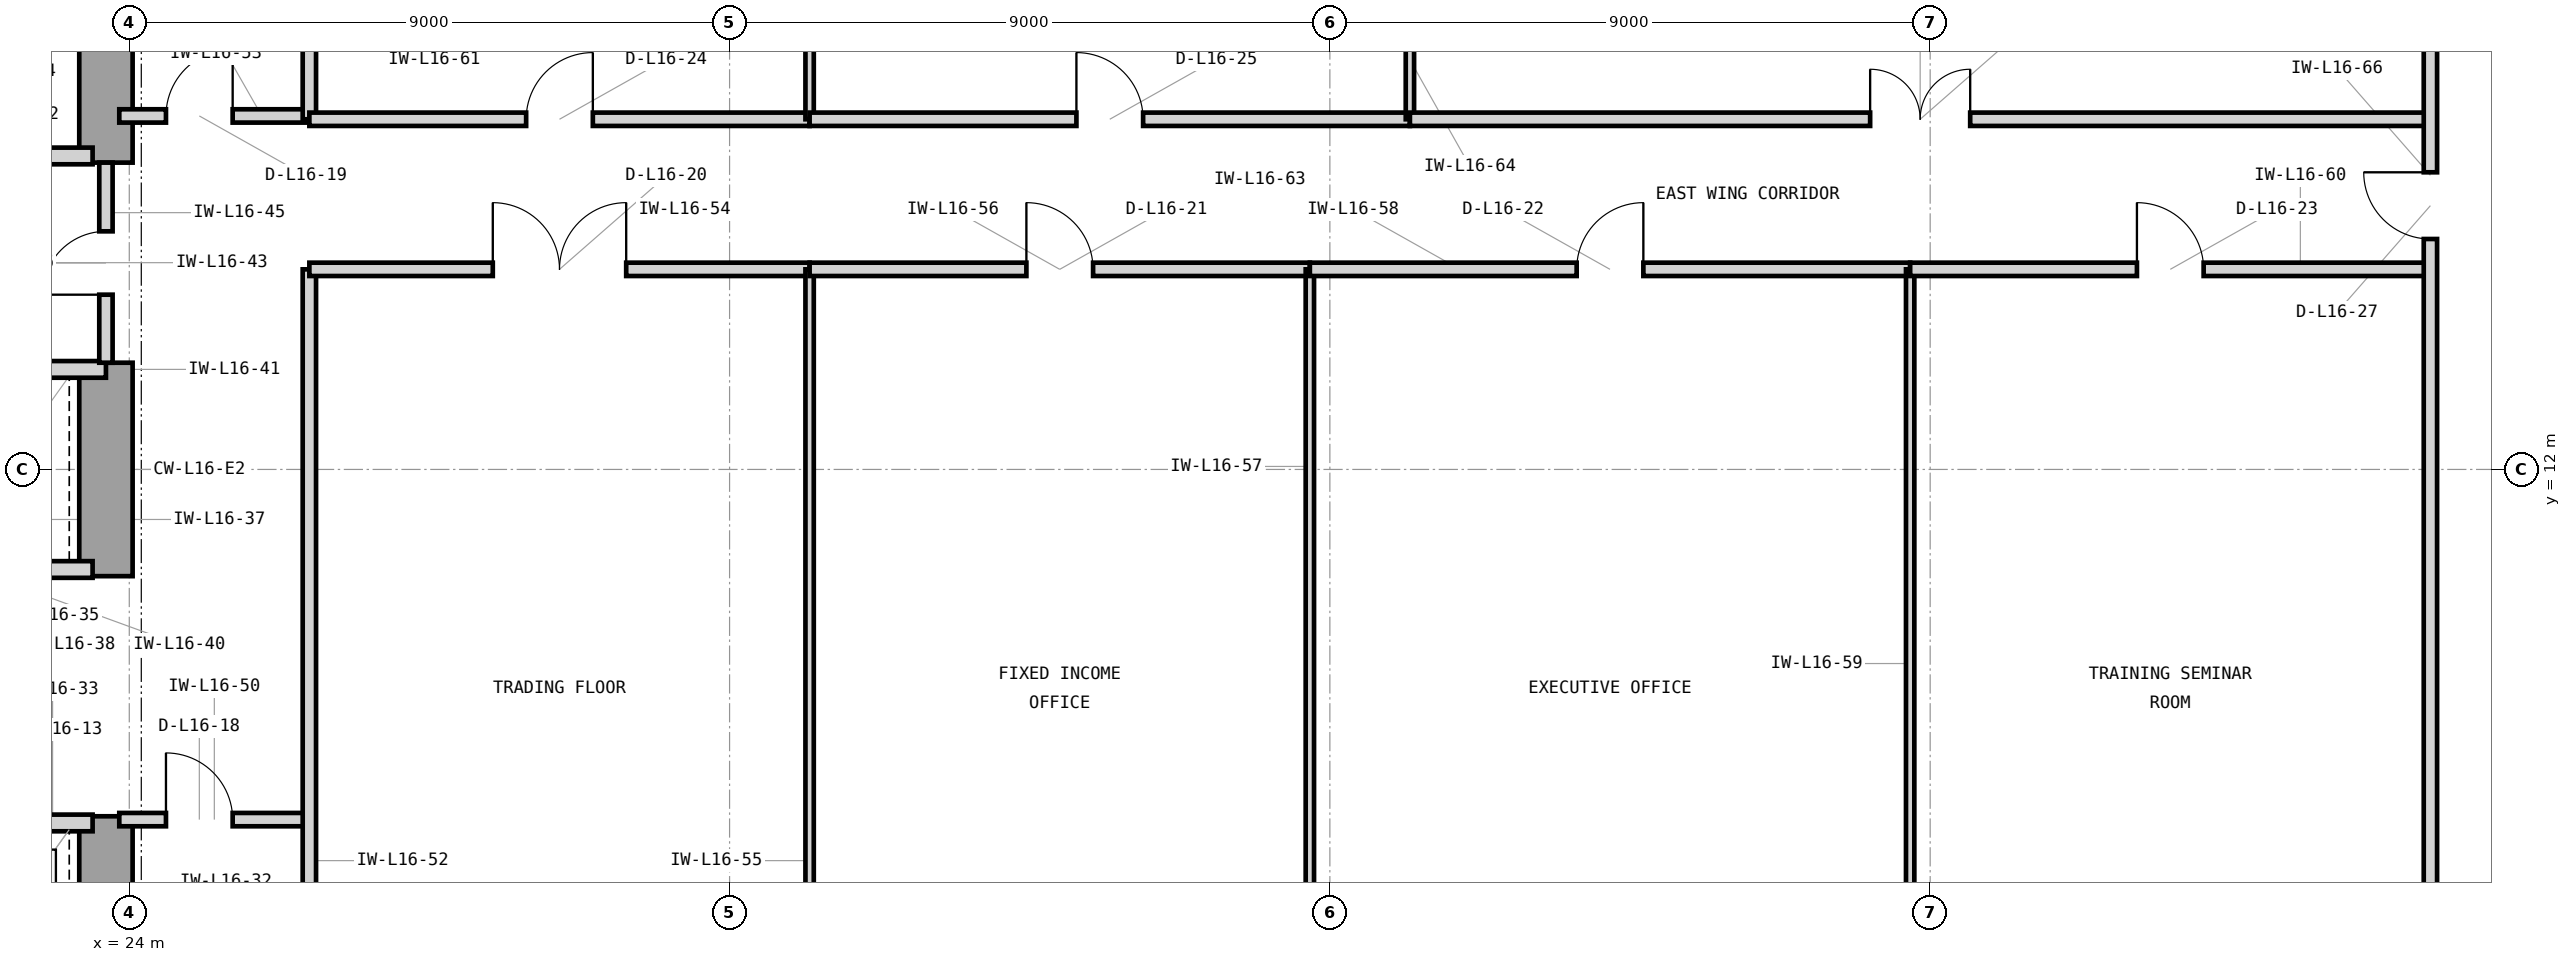
"""IFC4 building model, lengths in metres.
Left out: names, types, materials, properties, quantities, classifications, styles, units other than length and angle.
Written with IfcOpenShell. Run it as: python <this file> out.ifc"""

import sys

from ifc_helpers import new_model, si_unit, direction, frame, frame_2d, origin, place, context, subcontext, project, spatial, rectangle, extrude, element, fill, save


model = new_model("IFC4")
c1 = context("Model", 3, precision=1e-05, world=origin(), true_north=direction((0.0, 1.0)))
c2 = subcontext(c1, "Body", "Model", "MODEL_VIEW")
j1 = project(units=[si_unit("LENGTHUNIT", "METRE"), si_unit("PLANEANGLEUNIT", "RADIAN")], contexts=[c1])
p1 = place(None, origin())
s1 = spatial("IfcSite", under=j1, at=p1, CompositionType="ELEMENT")
p2 = place(p1, origin())
s2 = spatial("IfcBuilding", under=s1, at=p2, CompositionType="ELEMENT")
p3 = place(p2, frame((0.0, 0.0, 72.0)))
s3 = spatial("IfcBuildingStorey", under=s2, at=p3, CompositionType="ELEMENT", Elevation=72.0)
p4 = place(p3, frame((23.65, 3.75, 0.0), z_axis=(0.0, 0.0, 1.0), x_axis=(0.0, 1.0, 0.0)))
e1 = element("IfcWall", 1, at=p4, inside=s3, PredefinedType="SHEAR", context=c2, shape_type="SweptSolid", body=[
    extrude(rectangle(XDim=3.05, YDim=0.8, at=frame_2d((1.525, 0.0))), origin(), (0.0, 0.0, 1.0), 4.2),
])
p5 = place(p3, frame((23.65, 10.4, 0.0), z_axis=(0.0, 0.0, 1.0), x_axis=(0.0, 1.0, 0.0)))
e2 = element("IfcWall", 2, at=p5, inside=s3, PredefinedType="SHEAR", context=c2, shape_type="SweptSolid", body=[
    extrude(rectangle(XDim=3.2, YDim=0.8, at=frame_2d((1.6, 0.0))), origin(), (0.0, 0.0, 1.0), 4.2),
])
p6 = place(p3, frame((23.65, 16.6, 0.0), z_axis=(0.0, 0.0, 1.0), x_axis=(0.0, 1.0, 0.0)))
e3 = element("IfcWall", 3, at=p6, inside=s3, PredefinedType="SHEAR", context=c2, shape_type="SweptSolid", body=[
    extrude(rectangle(XDim=4.05, YDim=0.8, at=frame_2d((2.025, 0.0))), origin(), (0.0, 0.0, 1.0), 4.2),
])
p7 = place(p3, frame((21.05, 16.7, 0.0), z_axis=(0.0, 0.0, 1.0), x_axis=(1.0, 0.0, 0.0)))
e4 = element("IfcWall", 4, at=p7, inside=s3, PredefinedType="PARTITIONING", context=c2, shape_type="SweptSolid", body=[
    extrude(rectangle(XDim=2.4, YDim=0.25, at=frame_2d((1.2, 0.0))), origin(), (0.0, 0.0, 1.0), 3.426),
])
p8 = place(p3, frame((21.05, 6.7, 0.0), z_axis=(0.0, 0.0, 1.0), x_axis=(1.0, 0.0, 0.0)))
e5 = element("IfcWall", 5, at=p8, inside=s3, PredefinedType="PARTITIONING", context=c2, shape_type="SweptSolid", body=[
    extrude(rectangle(XDim=2.4, YDim=0.25, at=frame_2d((1.2, 0.0))), origin(), (0.0, 0.0, 1.0), 3.426),
])
p9 = place(p8, frame((0.48, 0.0, 0.0)))
e6 = element("IfcOpeningElement", 6, at=p9, cuts=e5, PredefinedType="OPENING", context=c2, shape_type="SweptSolid", body=[
    extrude(rectangle(XDim=1.15, YDim=2.25, at=frame_2d((0.575, 1.125))), frame((0.0, 0.135, 0.0), z_axis=(0.0, -1.0, 0.0), x_axis=(1.0, 0.0, 0.0)), (0.0, 0.0, 1.0), 0.27),
])
p10 = place(p3, frame((21.05, 10.5, 0.0), z_axis=(0.0, 0.0, 1.0), x_axis=(1.0, 0.0, 0.0)))
e7 = element("IfcWall", 7, at=p10, inside=s3, PredefinedType="PARTITIONING", context=c2, shape_type="SweptSolid", body=[
    extrude(rectangle(XDim=2.4, YDim=0.25, at=frame_2d((1.2, 0.0))), origin(), (0.0, 0.0, 1.0), 3.426),
])
p11 = place(p3, frame((14.7, 13.5, 0.0), z_axis=(0.0, 0.0, 1.0), x_axis=(1.0, 0.0, 0.0)))
e8 = element("IfcWall", 8, at=p11, inside=s3, PredefinedType="PARTITIONING", context=c2, shape_type="SweptSolid", body=[
    extrude(rectangle(XDim=8.95, YDim=0.25, at=frame_2d((4.475, 0.0))), origin(), (0.0, 0.0, 1.0), 3.426),
])
p12 = place(p3, frame((23.65, 13.6, 0.0), z_axis=(0.0, 0.0, 1.0), x_axis=(0.0, 1.0, 0.0)))
e9 = element("IfcWall", 9, at=p12, inside=s3, PredefinedType="PARTITIONING", context=c2, shape_type="SweptSolid", body=[
    extrude(rectangle(XDim=3.0, YDim=0.2, at=frame_2d((1.5, 0.0))), origin(), (0.0, 0.0, 1.0), 3.97),
])
p13 = place(p12, frame((1.02, 0.0, 0.0)))
e10 = element("IfcOpeningElement", 10, at=p13, cuts=e9, PredefinedType="OPENING", context=c2, shape_type="SweptSolid", body=[
    extrude(rectangle(XDim=0.95, YDim=2.1, at=frame_2d((0.475, 1.05))), frame((0.0, 0.11, 0.0), z_axis=(0.0, -1.0, 0.0), x_axis=(1.0, 0.0, 0.0)), (0.0, 0.0, 1.0), 0.22),
])
p14 = place(p3, frame((23.85, 6.75, 0.0), z_axis=(0.0, 0.0, 1.0), x_axis=(1.0, 0.0, 0.0)))
e11 = element("IfcWall", 11, at=p14, inside=s3, PredefinedType="PARTITIONING", context=c2, shape_type="SweptSolid", body=[
    extrude(rectangle(XDim=2.85, YDim=0.2, at=frame_2d((1.425, 0.0))), origin(), (0.0, 0.0, 1.0), 3.97),
])
p15 = place(p14, frame((0.7, 0.0, 0.0)))
e12 = element("IfcOpeningElement", 12, at=p15, cuts=e11, PredefinedType="OPENING", context=c2, shape_type="SweptSolid", body=[
    extrude(rectangle(XDim=1.0, YDim=2.15, at=frame_2d((0.5, 1.075))), frame((0.0, 0.11, 0.0), z_axis=(0.0, -1.0, 0.0), x_axis=(1.0, 0.0, 0.0)), (0.0, 0.0, 1.0), 0.22),
])
p16 = place(p3, frame((23.85, 17.3, 0.0), z_axis=(0.0, 0.0, 1.0), x_axis=(1.0, 0.0, 0.0)))
e13 = element("IfcWall", 13, at=p16, inside=s3, PredefinedType="PARTITIONING", context=c2, shape_type="SweptSolid", body=[
    extrude(rectangle(XDim=2.85, YDim=0.2, at=frame_2d((1.425, 0.0))), origin(), (0.0, 0.0, 1.0), 3.97),
])
p17 = place(p16, frame((0.7, 0.0, 0.0)))
e14 = element("IfcOpeningElement", 14, at=p17, cuts=e13, PredefinedType="OPENING", context=c2, shape_type="SweptSolid", body=[
    extrude(rectangle(XDim=1.0, YDim=2.15, at=frame_2d((0.5, 1.075))), frame((0.0, 0.11, 0.0), z_axis=(0.0, -1.0, 0.0), x_axis=(1.0, 0.0, 0.0)), (0.0, 0.0, 1.0), 0.22),
])
p18 = place(p3, frame((26.7, 3.18, 0.0), z_axis=(0.0, 0.0, 1.0), x_axis=(0.0, 1.0, 0.0)))
e15 = element("IfcWall", 15, at=p18, inside=s3, PredefinedType="PARTITIONING", context=c2, shape_type="SweptSolid", body=[
    extrude(rectangle(XDim=11.82, YDim=0.2, at=frame_2d((5.91, 0.0))), origin(), (0.0, 0.0, 1.0), 3.97),
])
p19 = place(p3, frame((26.7, 17.25, 0.0), z_axis=(0.0, 0.0, 1.0), x_axis=(0.0, 1.0, 0.0)))
e16 = element("IfcWall", 16, at=p19, inside=s3, PredefinedType="PARTITIONING", context=c2, shape_type="SweptSolid", body=[
    extrude(rectangle(XDim=3.57, YDim=0.2, at=frame_2d((1.785, 0.0))), origin(), (0.0, 0.0, 1.0), 3.97),
])
p20 = place(p3, frame((26.7, 15.0, 0.0), z_axis=(0.0, 0.0, 1.0), x_axis=(1.0, 0.0, 0.0)))
e17 = element("IfcWall", 17, at=p20, inside=s3, PredefinedType="PARTITIONING", context=c2, shape_type="SweptSolid", body=[
    extrude(rectangle(XDim=7.5, YDim=0.2, at=frame_2d((3.75, 0.0))), origin(), (0.0, 0.0, 1.0), 3.426),
])
p21 = place(p20, frame((2.75, 0.0, 0.0)))
e18 = element("IfcOpeningElement", 18, at=p21, cuts=e17, PredefinedType="OPENING", context=c2, shape_type="SweptSolid", body=[
    extrude(rectangle(XDim=2.0, YDim=2.5, at=frame_2d((1.0, 1.25))), frame((0.0, 0.11, 0.0), z_axis=(0.0, -1.0, 0.0), x_axis=(1.0, 0.0, 0.0)), (0.0, 0.0, 1.0), 0.22),
])
p22 = place(p3, frame((34.2, 3.18, 0.0), z_axis=(0.0, 0.0, 1.0), x_axis=(0.0, 1.0, 0.0)))
e19 = element("IfcWall", 19, at=p22, inside=s3, PredefinedType="PARTITIONING", context=c2, shape_type="SweptSolid", body=[
    extrude(rectangle(XDim=11.82, YDim=0.125, at=frame_2d((5.91, 0.0))), origin(), (0.0, 0.0, 1.0), 3.97),
])
p23 = place(p3, frame((34.2, 15.0, 0.0), z_axis=(0.0, 0.0, 1.0), x_axis=(1.0, 0.0, 0.0)))
e20 = element("IfcWall", 20, at=p23, inside=s3, PredefinedType="PARTITIONING", context=c2, shape_type="SweptSolid", body=[
    extrude(rectangle(XDim=7.5, YDim=0.2, at=frame_2d((3.75, 0.0))), origin(), (0.0, 0.0, 1.0), 3.426),
])
p24 = place(p23, frame((3.25, 0.0, 0.0)))
e21 = element("IfcOpeningElement", 21, at=p24, cuts=e20, PredefinedType="OPENING", context=c2, shape_type="SweptSolid", body=[
    extrude(rectangle(XDim=1.0, YDim=2.15, at=frame_2d((0.5, 1.075))), frame((0.0, 0.11, 0.0), z_axis=(0.0, -1.0, 0.0), x_axis=(1.0, 0.0, 0.0)), (0.0, 0.0, 1.0), 0.22),
])
p25 = place(p3, frame((41.7, 3.18, 0.0), z_axis=(0.0, 0.0, 1.0), x_axis=(0.0, 1.0, 0.0)))
e22 = element("IfcWall", 22, at=p25, inside=s3, PredefinedType="PARTITIONING", context=c2, shape_type="SweptSolid", body=[
    extrude(rectangle(XDim=11.82, YDim=0.125, at=frame_2d((5.91, 0.0))), origin(), (0.0, 0.0, 1.0), 3.97),
])
p26 = place(p3, frame((41.7, 15.0, 0.0), z_axis=(0.0, 0.0, 1.0), x_axis=(1.0, 0.0, 0.0)))
e23 = element("IfcWall", 23, at=p26, inside=s3, PredefinedType="PARTITIONING", context=c2, shape_type="SweptSolid", body=[
    extrude(rectangle(XDim=9.0, YDim=0.2, at=frame_2d((4.5, 0.0))), origin(), (0.0, 0.0, 1.0), 3.426),
])
p27 = place(p26, frame((4.0, 0.0, 0.0)))
e24 = element("IfcOpeningElement", 24, at=p27, cuts=e23, PredefinedType="OPENING", context=c2, shape_type="SweptSolid", body=[
    extrude(rectangle(XDim=1.0, YDim=2.15, at=frame_2d((0.5, 1.075))), frame((0.0, 0.11, 0.0), z_axis=(0.0, -1.0, 0.0), x_axis=(1.0, 0.0, 0.0)), (0.0, 0.0, 1.0), 0.22),
])
p28 = place(p3, frame((50.7, 3.18, 0.0), z_axis=(0.0, 0.0, 1.0), x_axis=(0.0, 1.0, 0.0)))
e25 = element("IfcWall", 25, at=p28, inside=s3, PredefinedType="PARTITIONING", context=c2, shape_type="SweptSolid", body=[
    extrude(rectangle(XDim=11.82, YDim=0.125, at=frame_2d((5.91, 0.0))), origin(), (0.0, 0.0, 1.0), 3.97),
])
p29 = place(p3, frame((50.7, 15.0, 0.0), z_axis=(0.0, 0.0, 1.0), x_axis=(1.0, 0.0, 0.0)))
e26 = element("IfcWall", 26, at=p29, inside=s3, PredefinedType="PARTITIONING", context=c2, shape_type="SweptSolid", body=[
    extrude(rectangle(XDim=7.8, YDim=0.2, at=frame_2d((3.9, 0.0))), origin(), (0.0, 0.0, 1.0), 3.426),
])
p30 = place(p29, frame((3.4, 0.0, 0.0)))
e27 = element("IfcOpeningElement", 27, at=p30, cuts=e26, PredefinedType="OPENING", context=c2, shape_type="SweptSolid", body=[
    extrude(rectangle(XDim=1.0, YDim=2.15, at=frame_2d((0.5, 1.075))), frame((0.0, 0.11, 0.0), z_axis=(0.0, -1.0, 0.0), x_axis=(1.0, 0.0, 0.0)), (0.0, 0.0, 1.0), 0.22),
])
p31 = place(p3, frame((26.7, 17.25, 0.0), z_axis=(0.0, 0.0, 1.0), x_axis=(1.0, 0.0, 0.0)))
e28 = element("IfcWall", 28, at=p31, inside=s3, PredefinedType="PARTITIONING", context=c2, shape_type="SweptSolid", body=[
    extrude(rectangle(XDim=7.5, YDim=0.2, at=frame_2d((3.75, 0.0))), origin(), (0.0, 0.0, 1.0), 3.97),
])
p32 = place(p31, frame((3.25, 0.0, 0.0)))
e29 = element("IfcOpeningElement", 29, at=p32, cuts=e28, PredefinedType="OPENING", context=c2, shape_type="SweptSolid", body=[
    extrude(rectangle(XDim=1.0, YDim=2.15, at=frame_2d((0.5, 1.075))), frame((0.0, 0.11, 0.0), z_axis=(0.0, -1.0, 0.0), x_axis=(1.0, 0.0, 0.0)), (0.0, 0.0, 1.0), 0.22),
])
p33 = place(p3, frame((34.2, 17.25, 0.0), z_axis=(0.0, 0.0, 1.0), x_axis=(0.0, 1.0, 0.0)))
e30 = element("IfcWall", 30, at=p33, inside=s3, PredefinedType="PARTITIONING", context=c2, shape_type="SweptSolid", body=[
    extrude(rectangle(XDim=3.57, YDim=0.125, at=frame_2d((1.785, 0.0))), origin(), (0.0, 0.0, 1.0), 3.97),
])
p34 = place(p3, frame((34.2, 17.25, 0.0), z_axis=(0.0, 0.0, 1.0), x_axis=(1.0, 0.0, 0.0)))
e31 = element("IfcWall", 31, at=p34, inside=s3, PredefinedType="PARTITIONING", context=c2, shape_type="SweptSolid", body=[
    extrude(rectangle(XDim=9.0, YDim=0.2, at=frame_2d((4.5, 0.0))), origin(), (0.0, 0.0, 1.0), 3.97),
])
p35 = place(p34, frame((4.0, 0.0, 0.0)))
e32 = element("IfcOpeningElement", 32, at=p35, cuts=e31, PredefinedType="OPENING", context=c2, shape_type="SweptSolid", body=[
    extrude(rectangle(XDim=1.0, YDim=2.15, at=frame_2d((0.5, 1.075))), frame((0.0, 0.11, 0.0), z_axis=(0.0, -1.0, 0.0), x_axis=(1.0, 0.0, 0.0)), (0.0, 0.0, 1.0), 0.22),
])
p36 = place(p3, frame((43.2, 17.25, 0.0), z_axis=(0.0, 0.0, 1.0), x_axis=(0.0, 1.0, 0.0)))
e33 = element("IfcWall", 33, at=p36, inside=s3, PredefinedType="PARTITIONING", context=c2, shape_type="SweptSolid", body=[
    extrude(rectangle(XDim=3.57, YDim=0.125, at=frame_2d((1.785, 0.0))), origin(), (0.0, 0.0, 1.0), 3.97),
])
p37 = place(p3, frame((43.2, 17.25, 0.0), z_axis=(0.0, 0.0, 1.0), x_axis=(1.0, 0.0, 0.0)))
e34 = element("IfcWall", 34, at=p37, inside=s3, PredefinedType="PARTITIONING", context=c2, shape_type="SweptSolid", body=[
    extrude(rectangle(XDim=15.3, YDim=0.2, at=frame_2d((7.65, 0.0))), origin(), (0.0, 0.0, 1.0), 3.97),
])
p38 = place(p37, frame((6.9, 0.0, 0.0)))
e35 = element("IfcOpeningElement", 35, at=p38, cuts=e34, PredefinedType="OPENING", context=c2, shape_type="SweptSolid", body=[
    extrude(rectangle(XDim=1.5, YDim=2.3, at=frame_2d((0.75, 1.15))), frame((0.0, 0.11, 0.0), z_axis=(0.0, -1.0, 0.0), x_axis=(1.0, 0.0, 0.0)), (0.0, 0.0, 1.0), 0.22),
])
p39 = place(p3, frame((58.5, 3.18, 0.0), z_axis=(0.0, 0.0, 1.0), x_axis=(0.0, 1.0, 0.0)))
e36 = element("IfcWall", 36, at=p39, inside=s3, PredefinedType="PARTITIONING", context=c2, shape_type="SweptSolid", body=[
    extrude(rectangle(XDim=17.64, YDim=0.2, at=frame_2d((8.82, 0.0))), origin(), (0.0, 0.0, 1.0), 3.97),
])
p40 = place(p39, frame((12.275, 0.0, 0.0)))
e37 = element("IfcOpeningElement", 37, at=p40, cuts=e36, PredefinedType="OPENING", context=c2, shape_type="SweptSolid", body=[
    extrude(rectangle(XDim=1.0, YDim=2.15, at=frame_2d((0.5, 1.075))), frame((0.0, 0.11, 0.0), z_axis=(0.0, -1.0, 0.0), x_axis=(1.0, 0.0, 0.0)), (0.0, 0.0, 1.0), 0.22),
])
p41 = place(p13, origin())
e38 = element("IfcDoor", 38, at=p41, inside=s3, OperationType="SINGLE_SWING_LEFT", PredefinedType="DOOR", context=c2, shape_type="SweptSolid", body=[
    extrude(rectangle(XDim=0.95, YDim=2.1, at=frame_2d((0.475, 1.05))), frame((0.0, 0.025, 0.0), z_axis=(0.0, -1.0, 0.0), x_axis=(1.0, 0.0, 0.0)), (0.0, 0.0, 1.0), 0.05),
])
fill(e10, e38)
p42 = place(p15, origin())
e39 = element("IfcDoor", 39, at=p42, inside=s3, OperationType="SINGLE_SWING_LEFT", PredefinedType="DOOR", context=c2, shape_type="SweptSolid", body=[
    extrude(rectangle(XDim=1.0, YDim=2.15, at=frame_2d((0.5, 1.075))), frame((0.0, 0.025, 0.0), z_axis=(0.0, -1.0, 0.0), x_axis=(1.0, 0.0, 0.0)), (0.0, 0.0, 1.0), 0.05),
])
fill(e12, e39)
p43 = place(p17, origin())
e40 = element("IfcDoor", 40, at=p43, inside=s3, OperationType="SINGLE_SWING_RIGHT", PredefinedType="DOOR", context=c2, shape_type="SweptSolid", body=[
    extrude(rectangle(XDim=1.0, YDim=2.15, at=frame_2d((0.5, 1.075))), frame((0.0, 0.025, 0.0), z_axis=(0.0, -1.0, 0.0), x_axis=(1.0, 0.0, 0.0)), (0.0, 0.0, 1.0), 0.05),
])
fill(e14, e40)
p44 = place(p21, origin())
e41 = element("IfcDoor", 41, at=p44, inside=s3, OperationType="DOUBLE_DOOR_SINGLE_SWING", PredefinedType="DOOR", context=c2, shape_type="SweptSolid", body=[
    extrude(rectangle(XDim=2.0, YDim=2.5, at=frame_2d((1.0, 1.25))), frame((0.0, 0.025, 0.0), z_axis=(0.0, -1.0, 0.0), x_axis=(1.0, 0.0, 0.0)), (0.0, 0.0, 1.0), 0.05),
])
fill(e18, e41)
p45 = place(p24, origin())
e42 = element("IfcDoor", 42, at=p45, inside=s3, OperationType="SINGLE_SWING_LEFT", PredefinedType="DOOR", context=c2, shape_type="SweptSolid", body=[
    extrude(rectangle(XDim=1.0, YDim=2.15, at=frame_2d((0.5, 1.075))), frame((0.0, 0.025, 0.0), z_axis=(0.0, -1.0, 0.0), x_axis=(1.0, 0.0, 0.0)), (0.0, 0.0, 1.0), 0.05),
])
fill(e21, e42)
p46 = place(p27, origin())
e43 = element("IfcDoor", 43, at=p46, inside=s3, OperationType="SINGLE_SWING_RIGHT", PredefinedType="DOOR", context=c2, shape_type="SweptSolid", body=[
    extrude(rectangle(XDim=1.0, YDim=2.15, at=frame_2d((0.5, 1.075))), frame((0.0, 0.025, 0.0), z_axis=(0.0, -1.0, 0.0), x_axis=(1.0, 0.0, 0.0)), (0.0, 0.0, 1.0), 0.05),
])
fill(e24, e43)
p47 = place(p30, origin())
e44 = element("IfcDoor", 44, at=p47, inside=s3, OperationType="SINGLE_SWING_LEFT", PredefinedType="DOOR", context=c2, shape_type="SweptSolid", body=[
    extrude(rectangle(XDim=1.0, YDim=2.15, at=frame_2d((0.5, 1.075))), frame((0.0, 0.025, 0.0), z_axis=(0.0, -1.0, 0.0), x_axis=(1.0, 0.0, 0.0)), (0.0, 0.0, 1.0), 0.05),
])
fill(e27, e44)
p48 = place(p32, origin())
e45 = element("IfcDoor", 45, at=p48, inside=s3, OperationType="SINGLE_SWING_RIGHT", PredefinedType="DOOR", context=c2, shape_type="SweptSolid", body=[
    extrude(rectangle(XDim=1.0, YDim=2.15, at=frame_2d((0.5, 1.075))), frame((0.0, 0.025, 0.0), z_axis=(0.0, -1.0, 0.0), x_axis=(1.0, 0.0, 0.0)), (0.0, 0.0, 1.0), 0.05),
])
fill(e29, e45)
p49 = place(p35, origin())
e46 = element("IfcDoor", 46, at=p49, inside=s3, OperationType="SINGLE_SWING_LEFT", PredefinedType="DOOR", context=c2, shape_type="SweptSolid", body=[
    extrude(rectangle(XDim=1.0, YDim=2.15, at=frame_2d((0.5, 1.075))), frame((0.0, 0.025, 0.0), z_axis=(0.0, -1.0, 0.0), x_axis=(1.0, 0.0, 0.0)), (0.0, 0.0, 1.0), 0.05),
])
fill(e32, e46)
p50 = place(p38, origin())
e47 = element("IfcDoor", 47, at=p50, inside=s3, OperationType="DOUBLE_DOOR_SINGLE_SWING", PredefinedType="DOOR", context=c2, shape_type="SweptSolid", body=[
    extrude(rectangle(XDim=1.5, YDim=2.3, at=frame_2d((0.75, 1.15))), frame((0.0, 0.025, 0.0), z_axis=(0.0, -1.0, 0.0), x_axis=(1.0, 0.0, 0.0)), (0.0, 0.0, 1.0), 0.05),
])
fill(e35, e47)
p51 = place(p40, origin())
e48 = element("IfcDoor", 48, at=p51, inside=s3, OperationType="SINGLE_SWING_RIGHT", PredefinedType="DOOR", context=c2, shape_type="SweptSolid", body=[
    extrude(rectangle(XDim=1.0, YDim=2.15, at=frame_2d((0.5, 1.075))), frame((0.0, 0.025, 0.0), z_axis=(0.0, -1.0, 0.0), x_axis=(1.0, 0.0, 0.0)), (0.0, 0.0, 1.0), 0.05),
])
fill(e37, e48)
save(model, sys.argv[1])
